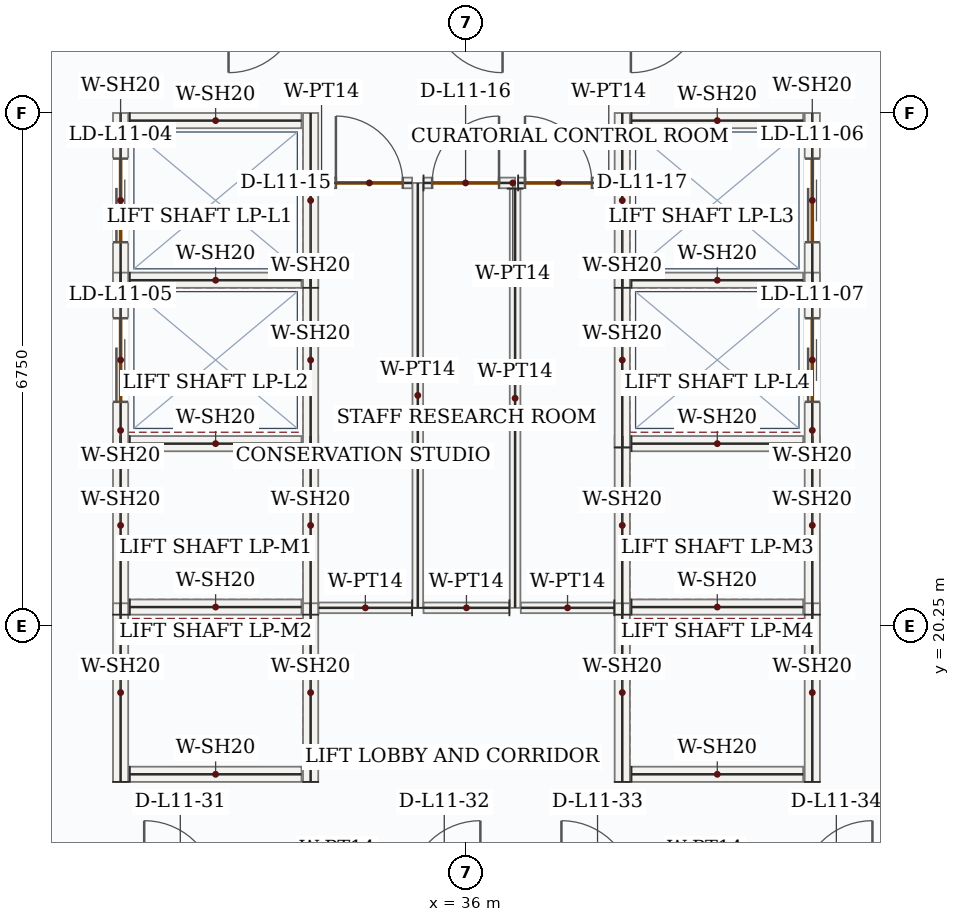
"""IFC4 building model, lengths in metres.
Left out: names, types, materials, properties, quantities, classifications, styles, units other than length and angle.
Written with IfcOpenShell. Run it as: python <this file> out.ifc"""

import sys

from ifc_helpers import new_model, si_unit, direction, frame, frame_2d, origin, place, context, subcontext, project, spatial, rectangle, extrude, source, transform, mapped, element, fill, save


model = new_model("IFC4")
c1 = context("Model", 3, precision=1e-05, world=origin(), true_north=direction((0.0, 1.0)))
c2 = subcontext(c1, "Body", "Model", "MODEL_VIEW")
j1 = project(units=[si_unit("LENGTHUNIT", "METRE"), si_unit("PLANEANGLEUNIT", "RADIAN")], contexts=[c1])
p1 = place(None, origin())
s1 = spatial("IfcSite", under=j1, at=p1, CompositionType="ELEMENT")
p2 = place(p1, origin())
s2 = spatial("IfcBuilding", under=s1, at=p2, CompositionType="ELEMENT")
p3 = place(p2, frame((0.0, 0.0, 54.3)))
s3 = spatial("IfcBuildingStorey", under=s2, at=p3, CompositionType="ELEMENT", Elevation=54.3)
m1 = source(origin(), c2, "Body", "SweptSolid", [
    extrude(rectangle(XDim=2.35, YDim=0.2, at=frame_2d((1.175, 0.0))), origin(), (0.0, 0.0, 1.0), 3.95),
])
for number, where, z_axis, x_axis in (
    (1, (31.45, 20.4, 0.0), (0.0, 0.0, 1.0), (0.0, 1.0, 0.0)),
    (2, (33.95, 20.4, 0.0), (0.0, 0.0, 1.0), (0.0, 1.0, 0.0)),
):
    element("IfcWall", number, at=place(p3, frame(where, z_axis=z_axis, x_axis=x_axis)), inside=s3, PredefinedType="SOLIDWALL", context=c2, shape_type="MappedRepresentation", body=[
        mapped(m1, transform((0.0, 0.0, 0.0), x_axis=(1.0, 0.0, 0.0), y_axis=(0.0, 1.0, 0.0), z_axis=(0.0, 0.0, 1.0), scale=1.0)),
    ])
m2 = source(origin(), c2, "Body", "SweptSolid", [
    extrude(rectangle(XDim=2.26, YDim=0.2, at=frame_2d((1.13, 0.0))), origin(), (0.0, 0.0, 1.0), 3.95),
])
for number, where, z_axis, x_axis in (
    (3, (31.57, 20.5, 0.0), (0.0, 0.0, 1.0), (1.0, 0.0, 0.0)),
    (4, (31.57, 22.65, 0.0), (0.0, 0.0, 1.0), (1.0, 0.0, 0.0)),
):
    element("IfcWall", number, at=place(p3, frame(where, z_axis=z_axis, x_axis=x_axis)), inside=s3, PredefinedType="SOLIDWALL", context=c2, shape_type="MappedRepresentation", body=[
        mapped(m2, transform((0.0, 0.0, 0.0), x_axis=(1.0, 0.0, 0.0), y_axis=(0.0, 1.0, 0.0), z_axis=(0.0, 0.0, 1.0), scale=1.0)),
    ])
for number, where, z_axis, x_axis in (
    (5, (31.45, 18.2, 0.0), (0.0, 0.0, 1.0), (0.0, 1.0, 0.0)),
    (6, (33.95, 18.2, 0.0), (0.0, 0.0, 1.0), (0.0, 1.0, 0.0)),
):
    element("IfcWall", number, at=place(p3, frame(where, z_axis=z_axis, x_axis=x_axis)), inside=s3, PredefinedType="SOLIDWALL", context=c2, shape_type="MappedRepresentation", body=[
        mapped(m1, transform((0.0, 0.0, 0.0), x_axis=(1.0, 0.0, 0.0), y_axis=(0.0, 1.0, 0.0), z_axis=(0.0, 0.0, 1.0), scale=1.0)),
    ])
p4 = place(p3, frame((31.57, 18.3, 0.0), z_axis=(0.0, 0.0, 1.0), x_axis=(1.0, 0.0, 0.0)))
e7 = element("IfcWall", 7, at=p4, inside=s3, PredefinedType="SOLIDWALL", context=c2, shape_type="MappedRepresentation", body=[
    mapped(m2, transform((0.0, 0.0, 0.0), x_axis=(1.0, 0.0, 0.0), y_axis=(0.0, 1.0, 0.0), z_axis=(0.0, 0.0, 1.0), scale=1.0)),
])
for number, where, z_axis, x_axis in (
    (8, (38.05, 20.4, 0.0), (0.0, 0.0, 1.0), (0.0, 1.0, 0.0)),
    (9, (40.55, 20.4, 0.0), (0.0, 0.0, 1.0), (0.0, 1.0, 0.0)),
):
    element("IfcWall", number, at=place(p3, frame(where, z_axis=z_axis, x_axis=x_axis)), inside=s3, PredefinedType="SOLIDWALL", context=c2, shape_type="MappedRepresentation", body=[
        mapped(m1, transform((0.0, 0.0, 0.0), x_axis=(1.0, 0.0, 0.0), y_axis=(0.0, 1.0, 0.0), z_axis=(0.0, 0.0, 1.0), scale=1.0)),
    ])
for number, where, z_axis, x_axis in (
    (10, (38.17, 20.5, 0.0), (0.0, 0.0, 1.0), (1.0, 0.0, 0.0)),
    (11, (38.17, 22.65, 0.0), (0.0, 0.0, 1.0), (1.0, 0.0, 0.0)),
):
    element("IfcWall", number, at=place(p3, frame(where, z_axis=z_axis, x_axis=x_axis)), inside=s3, PredefinedType="SOLIDWALL", context=c2, shape_type="MappedRepresentation", body=[
        mapped(m2, transform((0.0, 0.0, 0.0), x_axis=(1.0, 0.0, 0.0), y_axis=(0.0, 1.0, 0.0), z_axis=(0.0, 0.0, 1.0), scale=1.0)),
    ])
for number, where, z_axis, x_axis in (
    (12, (38.05, 18.2, 0.0), (0.0, 0.0, 1.0), (0.0, 1.0, 0.0)),
    (13, (40.55, 18.2, 0.0), (0.0, 0.0, 1.0), (0.0, 1.0, 0.0)),
):
    element("IfcWall", number, at=place(p3, frame(where, z_axis=z_axis, x_axis=x_axis)), inside=s3, PredefinedType="SOLIDWALL", context=c2, shape_type="MappedRepresentation", body=[
        mapped(m1, transform((0.0, 0.0, 0.0), x_axis=(1.0, 0.0, 0.0), y_axis=(0.0, 1.0, 0.0), z_axis=(0.0, 0.0, 1.0), scale=1.0)),
    ])
p5 = place(p3, frame((38.17, 18.3, 0.0), z_axis=(0.0, 0.0, 1.0), x_axis=(1.0, 0.0, 0.0)))
e14 = element("IfcWall", 14, at=p5, inside=s3, PredefinedType="SOLIDWALL", context=c2, shape_type="MappedRepresentation", body=[
    mapped(m2, transform((0.0, 0.0, 0.0), x_axis=(1.0, 0.0, 0.0), y_axis=(0.0, 1.0, 0.0), z_axis=(0.0, 0.0, 1.0), scale=1.0)),
])
p6 = place(p3, frame((31.45, 24.7, 0.0), z_axis=(0.0, 0.0, 1.0), x_axis=(0.0, 1.0, 0.0)))
e15 = element("IfcWall", 15, at=p6, inside=s3, PredefinedType="SOLIDWALL", context=c2, shape_type="SweptSolid", body=[
    extrude(rectangle(XDim=2.3, YDim=0.2, at=frame_2d((1.15, 0.0))), origin(), (0.0, 0.0, 1.0), 3.95),
])
p7 = place(p6, frame((0.6, 0.0, 0.0)))
e16 = element("IfcOpeningElement", 16, at=p7, cuts=e15, PredefinedType="OPENING", context=c2, shape_type="SweptSolid", body=[
    extrude(rectangle(XDim=1.1, YDim=2.15, at=frame_2d((0.55, 1.075))), frame((0.0, 0.11, 0.0), z_axis=(0.0, -1.0, 0.0), x_axis=(1.0, 0.0, 0.0)), (0.0, 0.0, 1.0), 0.22),
])
m3 = source(origin(), c2, "Body", "SweptSolid", [
    extrude(rectangle(XDim=2.3, YDim=0.2, at=frame_2d((1.15, 0.0))), origin(), (0.0, 0.0, 1.0), 3.95),
])
p8 = place(p3, frame((33.95, 24.7, 0.0), z_axis=(0.0, 0.0, 1.0), x_axis=(0.0, 1.0, 0.0)))
e17 = element("IfcWall", 17, at=p8, inside=s3, PredefinedType="SOLIDWALL", context=c2, shape_type="MappedRepresentation", body=[
    mapped(m3, transform((0.0, 0.0, 0.0), x_axis=(1.0, 0.0, 0.0), y_axis=(0.0, 1.0, 0.0), z_axis=(0.0, 0.0, 1.0), scale=1.0)),
])
for number, where, z_axis, x_axis in (
    (18, (31.57, 24.8, 0.0), (0.0, 0.0, 1.0), (1.0, 0.0, 0.0)),
    (19, (31.57, 26.9, 0.0), (0.0, 0.0, 1.0), (1.0, 0.0, 0.0)),
):
    element("IfcWall", number, at=place(p3, frame(where, z_axis=z_axis, x_axis=x_axis)), inside=s3, PredefinedType="SOLIDWALL", context=c2, shape_type="MappedRepresentation", body=[
        mapped(m2, transform((0.0, 0.0, 0.0), x_axis=(1.0, 0.0, 0.0), y_axis=(0.0, 1.0, 0.0), z_axis=(0.0, 0.0, 1.0), scale=1.0)),
    ])
p9 = place(p3, frame((31.45, 22.6, 0.0), z_axis=(0.0, 0.0, 1.0), x_axis=(0.0, 1.0, 0.0)))
e20 = element("IfcWall", 20, at=p9, inside=s3, PredefinedType="SOLIDWALL", context=c2, shape_type="SweptSolid", body=[
    extrude(rectangle(XDim=2.3, YDim=0.2, at=frame_2d((1.15, 0.0))), origin(), (0.0, 0.0, 1.0), 3.95),
])
p10 = place(p9, frame((0.6, 0.0, 0.0)))
e21 = element("IfcOpeningElement", 21, at=p10, cuts=e20, PredefinedType="OPENING", context=c2, shape_type="SweptSolid", body=[
    extrude(rectangle(XDim=1.1, YDim=2.15, at=frame_2d((0.55, 1.075))), frame((0.0, 0.11, 0.0), z_axis=(0.0, -1.0, 0.0), x_axis=(1.0, 0.0, 0.0)), (0.0, 0.0, 1.0), 0.22),
])
m4 = source(origin(), c2, "Body", "SweptSolid", [
    extrude(rectangle(XDim=2.3, YDim=0.2, at=frame_2d((1.15, 0.0))), origin(), (0.0, 0.0, 1.0), 3.95),
])
p11 = place(p3, frame((33.95, 22.6, 0.0), z_axis=(0.0, 0.0, 1.0), x_axis=(0.0, 1.0, 0.0)))
e22 = element("IfcWall", 22, at=p11, inside=s3, PredefinedType="SOLIDWALL", context=c2, shape_type="MappedRepresentation", body=[
    mapped(m4, transform((0.0, 0.0, 0.0), x_axis=(1.0, 0.0, 0.0), y_axis=(0.0, 1.0, 0.0), z_axis=(0.0, 0.0, 1.0), scale=1.0)),
])
p12 = place(p3, frame((38.05, 24.7, 0.0), z_axis=(0.0, 0.0, 1.0), x_axis=(0.0, 1.0, 0.0)))
e23 = element("IfcWall", 23, at=p12, inside=s3, PredefinedType="SOLIDWALL", context=c2, shape_type="MappedRepresentation", body=[
    mapped(m3, transform((0.0, 0.0, 0.0), x_axis=(1.0, 0.0, 0.0), y_axis=(0.0, 1.0, 0.0), z_axis=(0.0, 0.0, 1.0), scale=1.0)),
])
p13 = place(p3, frame((40.55, 24.7, 0.0), z_axis=(0.0, 0.0, 1.0), x_axis=(0.0, 1.0, 0.0)))
e24 = element("IfcWall", 24, at=p13, inside=s3, PredefinedType="SOLIDWALL", context=c2, shape_type="SweptSolid", body=[
    extrude(rectangle(XDim=2.3, YDim=0.2, at=frame_2d((1.15, 0.0))), origin(), (0.0, 0.0, 1.0), 3.95),
])
p14 = place(p13, frame((0.6, 0.0, 0.0)))
e25 = element("IfcOpeningElement", 25, at=p14, cuts=e24, PredefinedType="OPENING", context=c2, shape_type="SweptSolid", body=[
    extrude(rectangle(XDim=1.1, YDim=2.15, at=frame_2d((0.55, 1.075))), frame((0.0, 0.11, 0.0), z_axis=(0.0, -1.0, 0.0), x_axis=(1.0, 0.0, 0.0)), (0.0, 0.0, 1.0), 0.22),
])
for number, where, z_axis, x_axis in (
    (26, (38.17, 24.8, 0.0), (0.0, 0.0, 1.0), (1.0, 0.0, 0.0)),
    (27, (38.17, 26.9, 0.0), (0.0, 0.0, 1.0), (1.0, 0.0, 0.0)),
):
    element("IfcWall", number, at=place(p3, frame(where, z_axis=z_axis, x_axis=x_axis)), inside=s3, PredefinedType="SOLIDWALL", context=c2, shape_type="MappedRepresentation", body=[
        mapped(m2, transform((0.0, 0.0, 0.0), x_axis=(1.0, 0.0, 0.0), y_axis=(0.0, 1.0, 0.0), z_axis=(0.0, 0.0, 1.0), scale=1.0)),
    ])
p15 = place(p3, frame((38.05, 22.6, 0.0), z_axis=(0.0, 0.0, 1.0), x_axis=(0.0, 1.0, 0.0)))
e28 = element("IfcWall", 28, at=p15, inside=s3, PredefinedType="SOLIDWALL", context=c2, shape_type="MappedRepresentation", body=[
    mapped(m4, transform((0.0, 0.0, 0.0), x_axis=(1.0, 0.0, 0.0), y_axis=(0.0, 1.0, 0.0), z_axis=(0.0, 0.0, 1.0), scale=1.0)),
])
p16 = place(p3, frame((40.55, 22.6, 0.0), z_axis=(0.0, 0.0, 1.0), x_axis=(0.0, 1.0, 0.0)))
e29 = element("IfcWall", 29, at=p16, inside=s3, PredefinedType="SOLIDWALL", context=c2, shape_type="SweptSolid", body=[
    extrude(rectangle(XDim=2.3, YDim=0.2, at=frame_2d((1.15, 0.0))), origin(), (0.0, 0.0, 1.0), 3.95),
])
p17 = place(p16, frame((0.6, 0.0, 0.0)))
e30 = element("IfcOpeningElement", 30, at=p17, cuts=e29, PredefinedType="OPENING", context=c2, shape_type="SweptSolid", body=[
    extrude(rectangle(XDim=1.1, YDim=2.15, at=frame_2d((0.55, 1.075))), frame((0.0, 0.11, 0.0), z_axis=(0.0, -1.0, 0.0), x_axis=(1.0, 0.0, 0.0)), (0.0, 0.0, 1.0), 0.22),
])
m5 = source(origin(), c2, "Body", "SweptSolid", [
    extrude(rectangle(XDim=5.59, YDim=0.14, at=frame_2d((2.795, 0.0))), origin(), (0.0, 0.0, 1.0), 3.95),
])
p18 = place(p3, frame((35.36, 20.49, 0.0), z_axis=(0.0, 0.0, 1.0), x_axis=(0.0, 1.0, 0.0)))
e31 = element("IfcWall", 31, at=p18, inside=s3, PredefinedType="PARTITIONING", context=c2, shape_type="MappedRepresentation", body=[
    mapped(m5, transform((0.0, 0.0, 0.0), x_axis=(1.0, 0.0, 0.0), y_axis=(0.0, 1.0, 0.0), z_axis=(0.0, 0.0, 1.0), scale=1.0)),
])
p19 = place(p3, frame((35.435, 26.08, 0.0), z_axis=(0.0, 0.0, 1.0), x_axis=(1.0, 0.0, 0.0)))
e32 = element("IfcWall", 32, at=p19, inside=s3, PredefinedType="PARTITIONING", context=c2, shape_type="SweptSolid", body=[
    extrude(rectangle(XDim=1.205, YDim=0.14, at=frame_2d((0.603, 0.0))), origin(), (0.0, 0.0, 1.0), 3.95),
])
p20 = place(p19, frame((0.114, 0.0, 0.0)))
e33 = element("IfcOpeningElement", 33, at=p20, cuts=e32, PredefinedType="OPENING", context=c2, shape_type="SweptSolid", body=[
    extrude(rectangle(XDim=0.88, YDim=2.1, at=frame_2d((0.44, 1.05))), frame((0.0, 0.08, 0.0), z_axis=(0.0, -1.0, 0.0), x_axis=(1.0, 0.0, 0.0)), (0.0, 0.0, 1.0), 0.16),
])
m6 = source(origin(), c2, "Body", "SweptSolid", [
    extrude(rectangle(XDim=5.515, YDim=0.14, at=frame_2d((2.757, 0.0))), origin(), (0.0, 0.0, 1.0), 3.95),
])
p21 = place(p3, frame((36.64, 26.005, 0.0), z_axis=(0.0, 0.0, 1.0), x_axis=(0.0, -1.0, 0.0)))
e34 = element("IfcWall", 34, at=p21, inside=s3, PredefinedType="PARTITIONING", context=c2, shape_type="MappedRepresentation", body=[
    mapped(m6, transform((0.0, 0.0, 0.0), x_axis=(1.0, 0.0, 0.0), y_axis=(0.0, 1.0, 0.0), z_axis=(0.0, 0.0, 1.0), scale=1.0)),
])
m7 = source(origin(), c2, "Body", "SweptSolid", [
    extrude(rectangle(XDim=1.13, YDim=0.14, at=frame_2d((0.565, 0.0))), origin(), (0.0, 0.0, 1.0), 3.95),
])
p22 = place(p3, frame((36.565, 20.49, 0.0), z_axis=(0.0, 0.0, 1.0), x_axis=(-1.0, 0.0, 0.0)))
e35 = element("IfcWall", 35, at=p22, inside=s3, PredefinedType="PARTITIONING", context=c2, shape_type="MappedRepresentation", body=[
    mapped(m7, transform((0.0, 0.0, 0.0), x_axis=(1.0, 0.0, 0.0), y_axis=(0.0, 1.0, 0.0), z_axis=(0.0, 0.0, 1.0), scale=1.0)),
])
p23 = place(p3, frame((34.055, 26.08, 0.0), z_axis=(0.0, 0.0, 1.0), x_axis=(1.0, 0.0, 0.0)))
e36 = element("IfcWall", 36, at=p23, inside=s3, PredefinedType="PARTITIONING", context=c2, shape_type="SweptSolid", body=[
    extrude(rectangle(XDim=1.23, YDim=0.14, at=frame_2d((0.615, 0.0))), origin(), (0.0, 0.0, 1.0), 3.95),
])
p24 = place(p23, frame((0.228, 0.0, 0.0)))
e37 = element("IfcOpeningElement", 37, at=p24, cuts=e36, PredefinedType="OPENING", context=c2, shape_type="SweptSolid", body=[
    extrude(rectangle(XDim=0.88, YDim=2.1, at=frame_2d((0.44, 1.05))), frame((0.0, 0.08, 0.0), z_axis=(0.0, -1.0, 0.0), x_axis=(1.0, 0.0, 0.0)), (0.0, 0.0, 1.0), 0.16),
])
m8 = source(origin(), c2, "Body", "SweptSolid", [
    extrude(rectangle(XDim=1.23, YDim=0.14, at=frame_2d((0.615, 0.0))), origin(), (0.0, 0.0, 1.0), 3.95),
])
p25 = place(p3, frame((35.285, 20.49, 0.0), z_axis=(0.0, 0.0, 1.0), x_axis=(-1.0, 0.0, 0.0)))
e38 = element("IfcWall", 38, at=p25, inside=s3, PredefinedType="PARTITIONING", context=c2, shape_type="MappedRepresentation", body=[
    mapped(m8, transform((0.0, 0.0, 0.0), x_axis=(1.0, 0.0, 0.0), y_axis=(0.0, 1.0, 0.0), z_axis=(0.0, 0.0, 1.0), scale=1.0)),
])
p26 = place(p3, frame((36.68, 26.08, 0.0), z_axis=(0.0, 0.0, 1.0), x_axis=(1.0, 0.0, 0.0)))
e39 = element("IfcWall", 39, at=p26, inside=s3, PredefinedType="PARTITIONING", context=c2, shape_type="SweptSolid", body=[
    extrude(rectangle(XDim=1.265, YDim=0.14, at=frame_2d((0.633, 0.0))), origin(), (0.0, 0.0, 1.0), 3.95),
])
p27 = place(p26, frame((0.09, 0.0, 0.0)))
e40 = element("IfcOpeningElement", 40, at=p27, cuts=e39, PredefinedType="OPENING", context=c2, shape_type="SweptSolid", body=[
    extrude(rectangle(XDim=0.88, YDim=2.1, at=frame_2d((0.44, 1.05))), frame((0.0, 0.08, 0.0), z_axis=(0.0, -1.0, 0.0), x_axis=(1.0, 0.0, 0.0)), (0.0, 0.0, 1.0), 0.16),
])
p28 = place(p3, frame((37.945, 20.49, 0.0), z_axis=(0.0, 0.0, 1.0), x_axis=(-1.0, 0.0, 0.0)))
e41 = element("IfcWall", 41, at=p28, inside=s3, PredefinedType="PARTITIONING", context=c2, shape_type="MappedRepresentation", body=[
    mapped(m8, transform((0.0, 0.0, 0.0), x_axis=(1.0, 0.0, 0.0), y_axis=(0.0, 1.0, 0.0), z_axis=(0.0, 0.0, 1.0), scale=1.0)),
])
m9 = source(origin(), c2, "Body", "SweptSolid", [
    extrude(rectangle(XDim=1.1, YDim=2.15, at=frame_2d((0.55, 1.075))), frame((0.0, 0.025, 0.0), z_axis=(0.0, -1.0, 0.0), x_axis=(1.0, 0.0, 0.0)), (0.0, 0.0, 1.0), 0.05),
])
p29 = place(p7, origin())
e42 = element("IfcDoor", 42, at=p29, inside=s3, OperationType="DOUBLE_DOOR_SLIDING", PredefinedType="DOOR", context=c2, shape_type="MappedRepresentation", body=[
    mapped(m9, transform((0.0, 0.0, 0.0), x_axis=(1.0, 0.0, 0.0), y_axis=(0.0, 1.0, 0.0), z_axis=(0.0, 0.0, 1.0), scale=1.0)),
])
fill(e16, e42)
p30 = place(p10, origin())
e43 = element("IfcDoor", 43, at=p30, inside=s3, OperationType="DOUBLE_DOOR_SLIDING", PredefinedType="DOOR", context=c2, shape_type="MappedRepresentation", body=[
    mapped(m9, transform((0.0, 0.0, 0.0), x_axis=(1.0, 0.0, 0.0), y_axis=(0.0, 1.0, 0.0), z_axis=(0.0, 0.0, 1.0), scale=1.0)),
])
fill(e21, e43)
p31 = place(p14, origin())
e44 = element("IfcDoor", 44, at=p31, inside=s3, OperationType="DOUBLE_DOOR_SLIDING", PredefinedType="DOOR", context=c2, shape_type="MappedRepresentation", body=[
    mapped(m9, transform((0.0, 0.0, 0.0), x_axis=(1.0, 0.0, 0.0), y_axis=(0.0, 1.0, 0.0), z_axis=(0.0, 0.0, 1.0), scale=1.0)),
])
fill(e25, e44)
p32 = place(p17, origin())
e45 = element("IfcDoor", 45, at=p32, inside=s3, OperationType="DOUBLE_DOOR_SLIDING", PredefinedType="DOOR", context=c2, shape_type="MappedRepresentation", body=[
    mapped(m9, transform((0.0, 0.0, 0.0), x_axis=(1.0, 0.0, 0.0), y_axis=(0.0, 1.0, 0.0), z_axis=(0.0, 0.0, 1.0), scale=1.0)),
])
fill(e30, e45)
m10 = source(origin(), c2, "Body", "SweptSolid", [
    extrude(rectangle(XDim=0.88, YDim=2.1, at=frame_2d((0.44, 1.05))), frame((0.0, 0.025, 0.0), z_axis=(0.0, -1.0, 0.0), x_axis=(1.0, 0.0, 0.0)), (0.0, 0.0, 1.0), 0.05),
])
p33 = place(p24, origin())
e46 = element("IfcDoor", 46, at=p33, inside=s3, OperationType="SINGLE_SWING_LEFT", PredefinedType="DOOR", context=c2, shape_type="MappedRepresentation", body=[
    mapped(m10, transform((0.0, 0.0, 0.0), x_axis=(1.0, 0.0, 0.0), y_axis=(0.0, 1.0, 0.0), z_axis=(0.0, 0.0, 1.0), scale=1.0)),
])
fill(e37, e46)
p34 = place(p20, origin())
e47 = element("IfcDoor", 47, at=p34, inside=s3, OperationType="SINGLE_SWING_RIGHT", PredefinedType="DOOR", context=c2, shape_type="MappedRepresentation", body=[
    mapped(m10, transform((0.0, 0.0, 0.0), x_axis=(1.0, 0.0, 0.0), y_axis=(0.0, 1.0, 0.0), z_axis=(0.0, 0.0, 1.0), scale=1.0)),
])
fill(e33, e47)
p35 = place(p27, origin())
e48 = element("IfcDoor", 48, at=p35, inside=s3, OperationType="SINGLE_SWING_LEFT", PredefinedType="DOOR", context=c2, shape_type="MappedRepresentation", body=[
    mapped(m10, transform((0.0, 0.0, 0.0), x_axis=(1.0, 0.0, 0.0), y_axis=(0.0, 1.0, 0.0), z_axis=(0.0, 0.0, 1.0), scale=1.0)),
])
fill(e40, e48)
save(model, sys.argv[1])
